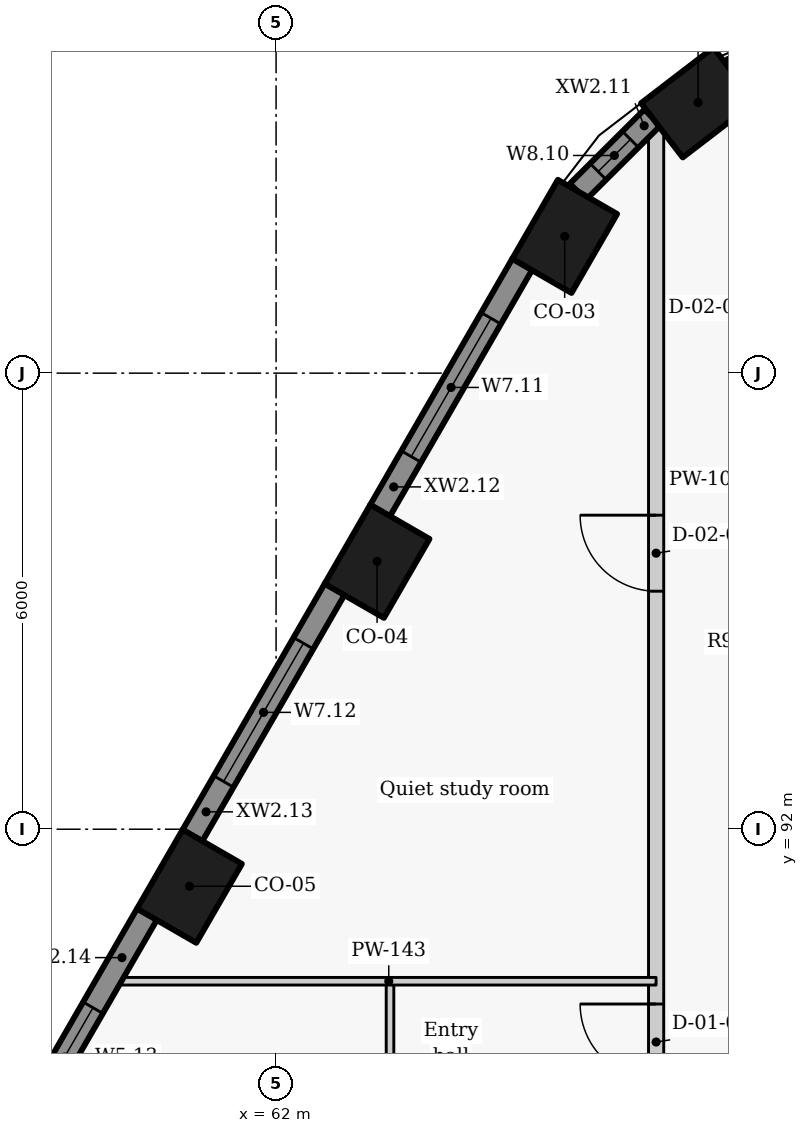
"""IFC4 building model, lengths in metres.
Left out: names, types, materials, properties, quantities, classifications, styles, units other than length and angle.
Written with IfcOpenShell. Run it as: python <this file> out.ifc"""

import sys

from ifc_helpers import new_model, si_unit, direction, frame, frame_2d, origin, origin_2d, place, context, subcontext, project, spatial, rectangle, extrude, element, fill, save


model = new_model("IFC4")
c1 = context("Model", 3, precision=1e-05, world=origin(), true_north=direction((0.0, 1.0)))
c2 = subcontext(c1, "Body", "Model", "MODEL_VIEW")
j1 = project(units=[si_unit("LENGTHUNIT", "METRE"), si_unit("PLANEANGLEUNIT", "RADIAN")], contexts=[c1])
p1 = place(None, origin())
s1 = spatial("IfcSite", under=j1, at=p1, CompositionType="ELEMENT")
p2 = place(p1, origin())
s2 = spatial("IfcBuilding", under=s1, at=p2, CompositionType="ELEMENT")
p3 = place(p2, frame((0.0, 0.0, 176.7)))
s3 = spatial("IfcBuildingStorey", under=s2, at=p3, CompositionType="ELEMENT", Elevation=176.7)
for number, where, z_axis, x_axis in (
    (1, (67.552, 101.56, 0.0), (0.0, 0.0, 1.0), (-0.793, -0.609, 0.0)),
    (2, (65.797, 99.8, 0.0), (0.0, 0.0, 1.0), (-0.5, -0.866, 0.0)),
    (3, (63.329, 95.525, 0.0), (0.0, 0.0, 1.0), (-0.5, -0.866, 0.0)),
    (4, (60.861, 91.25, 0.0), (0.0, 0.0, 1.0), (-0.5, -0.866, 0.0)),
):
    element("IfcColumn", number, at=place(p3, frame(where, z_axis=z_axis, x_axis=x_axis)), inside=s3, PredefinedType="COLUMN", context=c2, shape_type="SweptSolid", body=[
        extrude(rectangle(XDim=1.2, YDim=0.9, at=origin_2d()), origin(), (0.0, 0.0, 1.0), 3.3),
    ])
p4 = place(p3, frame((69.336, 102.333, 0.0), z_axis=(0.0, 0.0, 1.0), x_axis=(-0.969037396898, -0.246914000036, 0.0)))
e5 = element("IfcWall", 5, at=p4, inside=s3, PredefinedType="SOLIDWALL", context=c2, shape_type="SweptSolid", body=[
    extrude(rectangle(XDim=1.403, YDim=0.3, at=frame_2d((0.702, 0.0))), origin(), (0.0, 0.0, 1.0), 2.425),
])
p5 = place(p4, frame((0.229, 0.0, 0.9)))
e6 = element("IfcOpeningElement", 6, at=p5, cuts=e5, PredefinedType="OPENING", context=c2, shape_type="SweptSolid", body=[
    extrude(rectangle(XDim=0.6, YDim=1.1, at=frame_2d((0.3, 0.55))), frame((0.0, 0.16, 0.0), z_axis=(0.0, -1.0, 0.0), x_axis=(1.0, 0.0, 0.0)), (0.0, 0.0, 1.0), 0.32),
])
p6 = place(p3, frame((66.952, 101.363, 0.0), z_axis=(0.0, 0.0, 1.0), x_axis=(-0.70869320446, -0.705516790695, 0.0)))
e7 = element("IfcWall", 7, at=p6, inside=s3, PredefinedType="SOLIDWALL", context=c2, shape_type="SweptSolid", body=[
    extrude(rectangle(XDim=1.384, YDim=0.3, at=frame_2d((0.692, 0.0))), origin(), (0.0, 0.0, 1.0), 2.425),
])
p7 = place(p6, frame((0.408, 0.0, 0.9)))
e8 = element("IfcOpeningElement", 8, at=p7, cuts=e7, PredefinedType="OPENING", context=c2, shape_type="SweptSolid", body=[
    extrude(rectangle(XDim=0.6, YDim=1.1, at=frame_2d((0.3, 0.55))), frame((0.0, 0.16, 0.0), z_axis=(0.0, -1.0, 0.0), x_axis=(1.0, 0.0, 0.0)), (0.0, 0.0, 1.0), 0.32),
])
p8 = place(p3, frame((65.239, 99.433, 0.0), z_axis=(0.0, 0.0, 1.0), x_axis=(-0.499982088007, -0.866035745032, 0.0)))
e9 = element("IfcWall", 9, at=p8, inside=s3, PredefinedType="SOLIDWALL", context=c2, shape_type="SweptSolid", body=[
    extrude(rectangle(XDim=3.744, YDim=0.3, at=frame_2d((1.872, 0.0))), origin(), (0.0, 0.0, 1.0), 2.425),
])
p9 = place(p8, frame((0.822, 0.0, 0.9)))
e10 = element("IfcOpeningElement", 10, at=p9, cuts=e9, PredefinedType="OPENING", context=c2, shape_type="SweptSolid", body=[
    extrude(rectangle(XDim=2.1, YDim=1.1, at=frame_2d((1.05, 0.55))), frame((0.0, 0.16, 0.0), z_axis=(0.0, -1.0, 0.0), x_axis=(1.0, 0.0, 0.0)), (0.0, 0.0, 1.0), 0.32),
])
p10 = place(p3, frame((62.771, 95.158, 0.0), z_axis=(0.0, 0.0, 1.0), x_axis=(-0.500059225181, -0.86599120741, 0.0)))
e11 = element("IfcWall", 11, at=p10, inside=s3, PredefinedType="SOLIDWALL", context=c2, shape_type="SweptSolid", body=[
    extrude(rectangle(XDim=3.744, YDim=0.3, at=frame_2d((1.872, 0.0))), origin(), (0.0, 0.0, 1.0), 2.425),
])
p11 = place(p10, frame((0.822, 0.0, 0.9)))
e12 = element("IfcOpeningElement", 12, at=p11, cuts=e11, PredefinedType="OPENING", context=c2, shape_type="SweptSolid", body=[
    extrude(rectangle(XDim=2.1, YDim=1.1, at=frame_2d((1.05, 0.55))), frame((0.0, 0.16, 0.0), z_axis=(0.0, -1.0, 0.0), x_axis=(1.0, 0.0, 0.0)), (0.0, 0.0, 1.0), 0.32),
])
p12 = place(p3, frame((60.303, 90.884, 0.0), z_axis=(0.0, 0.0, 1.0), x_axis=(-0.499955427682, -0.866051136095, 0.0)))
e13 = element("IfcWall", 13, at=p12, inside=s3, PredefinedType="SOLIDWALL", context=c2, shape_type="SweptSolid", body=[
    extrude(rectangle(XDim=3.447, YDim=0.3, at=frame_2d((1.724, 0.0))), origin(), (0.0, 0.0, 1.0), 2.425),
])
p13 = place(p12, frame((1.423, 0.0, 0.9)))
e14 = element("IfcOpeningElement", 14, at=p13, cuts=e13, PredefinedType="OPENING", context=c2, shape_type="SweptSolid", body=[
    extrude(rectangle(XDim=1.5, YDim=1.1, at=frame_2d((0.75, 0.55))), frame((0.0, 0.16, 0.0), z_axis=(0.0, -1.0, 0.0), x_axis=(1.0, 0.0, 0.0)), (0.0, 0.0, 1.0), 0.32),
])
p14 = place(p3, frame((67.0, 58.674, 0.0), z_axis=(0.0, 0.0, 1.0), x_axis=(0.0, 1.0, 0.0)))
e15 = element("IfcWall", 15, at=p14, inside=s3, PredefinedType="PARTITIONING", context=c2, shape_type="SweptSolid", body=[
    extrude(rectangle(XDim=42.592, YDim=0.2, at=frame_2d((21.296, 0.0))), origin(), (0.0, 0.0, 1.0), 2.405),
])
p15 = place(p14, frame((2.376, 0.0, 0.0)))
e16 = element("IfcOpeningElement", 16, at=p15, cuts=e15, PredefinedType="OPENING", context=c2, shape_type="SweptSolid", body=[
    extrude(rectangle(XDim=1.0, YDim=2.1, at=frame_2d((0.5, 1.05))), frame((0.0, 0.11, 0.0), z_axis=(0.0, -1.0, 0.0), x_axis=(1.0, 0.0, 0.0)), (0.0, 0.0, 1.0), 0.22),
])
p16 = place(p14, frame((13.601, 0.0, 0.0)))
e17 = element("IfcOpeningElement", 17, at=p16, cuts=e15, PredefinedType="OPENING", context=c2, shape_type="SweptSolid", body=[
    extrude(rectangle(XDim=1.0, YDim=2.1, at=frame_2d((0.5, 1.05))), frame((0.0, 0.11, 0.0), z_axis=(0.0, -1.0, 0.0), x_axis=(1.0, 0.0, 0.0)), (0.0, 0.0, 1.0), 0.22),
])
p17 = place(p14, frame((30.026, 0.0, 0.0)))
e18 = element("IfcOpeningElement", 18, at=p17, cuts=e15, PredefinedType="OPENING", context=c2, shape_type="SweptSolid", body=[
    extrude(rectangle(XDim=1.0, YDim=2.1, at=frame_2d((0.5, 1.05))), frame((0.0, 0.11, 0.0), z_axis=(0.0, -1.0, 0.0), x_axis=(1.0, 0.0, 0.0)), (0.0, 0.0, 1.0), 0.22),
])
p18 = place(p14, frame((36.457, 0.0, 0.0)))
e19 = element("IfcOpeningElement", 19, at=p18, cuts=e15, PredefinedType="OPENING", context=c2, shape_type="SweptSolid", body=[
    extrude(rectangle(XDim=1.0, YDim=2.1, at=frame_2d((0.5, 1.05))), frame((0.0, 0.11, 0.0), z_axis=(0.0, -1.0, 0.0), x_axis=(1.0, 0.0, 0.0)), (0.0, 0.0, 1.0), 0.22),
])
p19 = place(p3, frame((63.499, 82.55, 0.0), z_axis=(0.0, 0.0, 1.0), x_axis=(0.0, 1.0, 0.0)))
e20 = element("IfcWall", 20, at=p19, inside=s3, PredefinedType="PARTITIONING", context=c2, shape_type="SweptSolid", body=[
    extrude(rectangle(XDim=7.45, YDim=0.1, at=frame_2d((3.725, 0.0))), origin(), (0.0, 0.0, 1.0), 2.405),
])
p20 = place(p19, frame((3.275, 0.0, 0.0)))
e21 = element("IfcOpeningElement", 21, at=p20, cuts=e20, PredefinedType="OPENING", context=c2, shape_type="SweptSolid", body=[
    extrude(rectangle(XDim=0.9, YDim=2.1, at=frame_2d((0.45, 1.05))), frame((0.0, 0.06, 0.0), z_axis=(0.0, -1.0, 0.0), x_axis=(1.0, 0.0, 0.0)), (0.0, 0.0, 1.0), 0.12),
])
p21 = place(p3, frame((59.966, 90.0, 0.0), z_axis=(0.0, 0.0, 1.0), x_axis=(1.0, 0.0, 0.0)))
e22 = element("IfcWall", 22, at=p21, inside=s3, PredefinedType="PARTITIONING", context=c2, shape_type="SweptSolid", body=[
    extrude(rectangle(XDim=7.033, YDim=0.1, at=frame_2d((3.517, 0.0))), origin(), (0.0, 0.0, 1.0), 2.405),
])
p22 = place(p7, origin())
e23 = element("IfcWindow", 23, at=p22, inside=s3, PartitioningType="SINGLE_PANEL", PredefinedType="WINDOW", context=c2, shape_type="SweptSolid", body=[
    extrude(rectangle(XDim=0.6, YDim=1.1, at=frame_2d((0.3, 0.55))), frame((0.0, 0.03, 0.0), z_axis=(0.0, -1.0, 0.0), x_axis=(1.0, 0.0, 0.0)), (0.0, 0.0, 1.0), 0.06),
])
fill(e8, e23)
p23 = place(p9, origin())
e24 = element("IfcWindow", 24, at=p23, inside=s3, PartitioningType="SINGLE_PANEL", PredefinedType="WINDOW", context=c2, shape_type="SweptSolid", body=[
    extrude(rectangle(XDim=2.1, YDim=1.1, at=frame_2d((1.05, 0.55))), frame((0.0, 0.03, 0.0), z_axis=(0.0, -1.0, 0.0), x_axis=(1.0, 0.0, 0.0)), (0.0, 0.0, 1.0), 0.06),
])
fill(e10, e24)
p24 = place(p11, origin())
e25 = element("IfcWindow", 25, at=p24, inside=s3, PartitioningType="SINGLE_PANEL", PredefinedType="WINDOW", context=c2, shape_type="SweptSolid", body=[
    extrude(rectangle(XDim=2.1, YDim=1.1, at=frame_2d((1.05, 0.55))), frame((0.0, 0.03, 0.0), z_axis=(0.0, -1.0, 0.0), x_axis=(1.0, 0.0, 0.0)), (0.0, 0.0, 1.0), 0.06),
])
fill(e12, e25)
p25 = place(p13, origin())
e26 = element("IfcWindow", 26, at=p25, inside=s3, PartitioningType="SINGLE_PANEL", PredefinedType="WINDOW", context=c2, shape_type="SweptSolid", body=[
    extrude(rectangle(XDim=1.5, YDim=1.1, at=frame_2d((0.75, 0.55))), frame((0.0, 0.03, 0.0), z_axis=(0.0, -1.0, 0.0), x_axis=(1.0, 0.0, 0.0)), (0.0, 0.0, 1.0), 0.06),
])
fill(e14, e26)
p26 = place(p17, origin())
e27 = element("IfcDoor", 27, at=p26, inside=s3, OperationType="SINGLE_SWING_RIGHT", PredefinedType="DOOR", context=c2, shape_type="SweptSolid", body=[
    extrude(rectangle(XDim=1.0, YDim=2.1, at=frame_2d((0.5, 1.05))), frame((0.0, 0.025, 0.0), z_axis=(0.0, -1.0, 0.0), x_axis=(1.0, 0.0, 0.0)), (0.0, 0.0, 1.0), 0.05),
])
fill(e18, e27)
p27 = place(p18, origin())
e28 = element("IfcDoor", 28, at=p27, inside=s3, OperationType="SINGLE_SWING_RIGHT", PredefinedType="DOOR", context=c2, shape_type="SweptSolid", body=[
    extrude(rectangle(XDim=1.0, YDim=2.1, at=frame_2d((0.5, 1.05))), frame((0.0, 0.025, 0.0), z_axis=(0.0, -1.0, 0.0), x_axis=(1.0, 0.0, 0.0)), (0.0, 0.0, 1.0), 0.05),
])
fill(e19, e28)
save(model, sys.argv[1])
